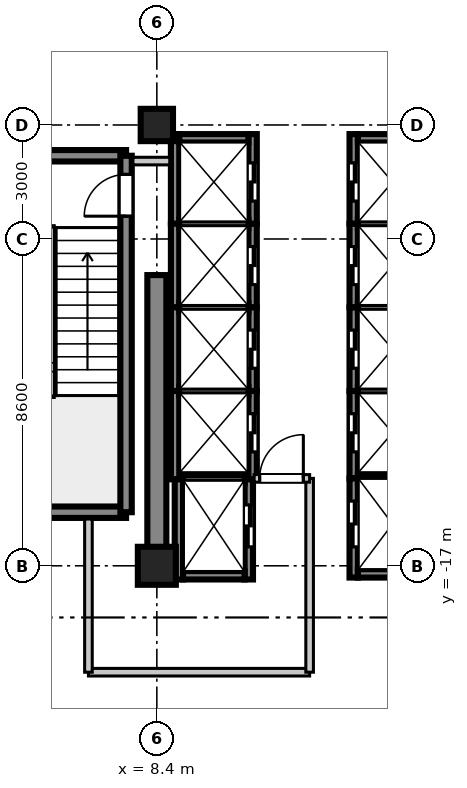
"""IFC4 building model, lengths in metres.
Left out: names, types, materials, properties, quantities, classifications, styles, units other than length and angle.
Written with IfcOpenShell. Run it as: python <this file> out.ifc"""

import sys

from ifc_helpers import new_model, si_unit, direction, frame, frame_2d, origin, origin_2d, place, context, subcontext, project, spatial, rectangle, extrude, source, transform, mapped, element, fill, save


model = new_model("IFC4")
c1 = context("Model", 3, precision=1e-05, world=origin(), true_north=direction((0.0, 1.0)))
c2 = subcontext(c1, "Body", "Model", "MODEL_VIEW")
j1 = project(units=[si_unit("LENGTHUNIT", "METRE"), si_unit("PLANEANGLEUNIT", "RADIAN")], contexts=[c1])
p1 = place(None, origin())
s1 = spatial("IfcSite", under=j1, at=p1, CompositionType="ELEMENT")
p2 = place(p1, origin())
s2 = spatial("IfcBuilding", under=s1, at=p2, CompositionType="ELEMENT")
p3 = place(p2, frame((0.0, 0.0, 256.7)))
s3 = spatial("IfcBuildingStorey", under=s2, at=p3, CompositionType="ELEMENT", Elevation=256.7)
m1 = source(origin(), c2, "Body", "SweptSolid", [
    extrude(rectangle(XDim=1.0, YDim=1.0, at=origin_2d()), origin(), (0.0, 0.0, 1.0), 4.755),
])
p4 = place(p3, frame((8.4, -17.0, 0.0), z_axis=(0.0, 0.0, 1.0), x_axis=(1.0, 0.0, 0.0)))
e1 = element("IfcColumn", 1, at=p4, inside=s3, PredefinedType="COLUMN", context=c2, shape_type="MappedRepresentation", body=[
    mapped(m1, transform((0.0, 0.0, 0.0), scale=1.0)),
])
m2 = source(origin(), c2, "Body", "SweptSolid", [
    extrude(rectangle(XDim=0.85, YDim=0.85, at=origin_2d()), origin(), (0.0, 0.0, 1.0), 4.755),
])
p5 = place(p3, frame((8.4, -5.4, 0.0), z_axis=(0.0, 0.0, 1.0), x_axis=(1.0, 0.0, 0.0)))
e2 = element("IfcColumn", 2, at=p5, inside=s3, PredefinedType="PILASTER", context=c2, shape_type="MappedRepresentation", body=[
    mapped(m2, transform((0.0, 0.0, 0.0), scale=1.0)),
])
m3 = source(origin(), c2, "Body", "SweptSolid", [
    extrude(rectangle(XDim=7.65, YDim=0.5, at=frame_2d((3.825, 0.0))), origin(), (0.0, 0.0, 1.0), 4.44),
])
p6 = place(p3, frame((8.4, -17.0, 0.0), z_axis=(0.0, 0.0, 1.0), x_axis=(0.0, 1.0, 0.0)))
e3 = element("IfcWall", 3, at=p6, inside=s3, PredefinedType="SHEAR", context=c2, shape_type="MappedRepresentation", body=[
    mapped(m3, transform((0.0, 0.0, 0.0), scale=1.0)),
])
m4 = source(origin(), c2, "Body", "SweptSolid", [
    extrude(rectangle(XDim=3.98, YDim=0.3, at=frame_2d((1.99, 0.0))), origin(), (0.0, 0.0, 1.0), 4.44),
])
for number, where, z_axis, x_axis in (
    (4, (3.61, -15.59, 0.0), (0.0, 0.0, 1.0), (1.0, 0.0, 0.0)),
    (5, (3.61, -6.21, 0.0), (0.0, 0.0, 1.0), (1.0, 0.0, 0.0)),
):
    element("IfcWall", number, at=place(p3, frame(where, z_axis=z_axis, x_axis=x_axis)), inside=s3, PredefinedType="SHEAR", context=c2, shape_type="MappedRepresentation", body=[
        mapped(m4, transform((0.0, 0.0, 0.0), scale=1.0)),
    ])
m5 = source(origin(), c2, "Body", "SweptSolid", [
    extrude(rectangle(XDim=9.38, YDim=0.3, at=frame_2d((4.69, 0.0))), origin(), (0.0, 0.0, 1.0), 4.44),
])
p7 = place(p3, frame((7.59, -15.59, 0.0), z_axis=(0.0, 0.0, 1.0), x_axis=(0.0, 1.0, 0.0)))
e6 = element("IfcWall", 6, at=p7, inside=s3, PredefinedType="SHEAR", context=c2, shape_type="MappedRepresentation", body=[
    mapped(m5, transform((0.0, 0.0, 0.0), scale=1.0)),
])
p8 = place(p7, frame((7.79, 0.0, 0.0)))
e7 = element("IfcOpeningElement", 7, at=p8, cuts=e6, PredefinedType="OPENING", context=c2, shape_type="SweptSolid", body=[
    extrude(rectangle(XDim=1.1, YDim=2.15, at=frame_2d((0.55, 1.075))), frame((0.0, 0.16, 0.0), z_axis=(0.0, -1.0, 0.0), x_axis=(1.0, 0.0, 0.0)), (0.0, 0.0, 1.0), 0.32),
])
m6 = source(origin(), c2, "Body", "SweptSolid", [
    extrude(rectangle(XDim=2.36, YDim=0.22, at=frame_2d((1.18, 0.0))), origin(), (0.0, 0.0, 1.0), 4.44),
])
p9 = place(p3, frame((13.58, -8.0, 0.0), z_axis=(0.0, 0.0, 1.0), x_axis=(0.0, 1.0, 0.0)))
e8 = element("IfcWall", 8, at=p9, inside=s3, PredefinedType="SHEAR", context=c2, shape_type="MappedRepresentation", body=[
    mapped(m6, transform((0.0, 0.0, 0.0), scale=1.0)),
])
p10 = place(p9, frame((0.6, 0.0, 0.0)))
e9 = element("IfcOpeningElement", 9, at=p10, cuts=e8, PredefinedType="OPENING", context=c2, shape_type="SweptSolid", body=[
    extrude(rectangle(XDim=1.0, YDim=2.2, at=frame_2d((0.5, 1.1))), frame((0.0, 0.12, 0.0), z_axis=(0.0, -1.0, 0.0), x_axis=(1.0, 0.0, 0.0)), (0.0, 0.0, 1.0), 0.24),
])
m7 = source(origin(), c2, "Body", "SweptSolid", [
    extrude(rectangle(XDim=1.82, YDim=0.22, at=frame_2d((0.91, 0.0))), origin(), (0.0, 0.0, 1.0), 4.44),
])
p11 = place(p3, frame((13.69, -5.75, 0.0), z_axis=(0.0, 0.0, 1.0), x_axis=(1.0, 0.0, 0.0)))
e10 = element("IfcWall", 10, at=p11, inside=s3, PredefinedType="SHEAR", context=c2, shape_type="MappedRepresentation", body=[
    mapped(m7, transform((0.0, 0.0, 0.0), scale=1.0)),
])
m8 = source(origin(), c2, "Body", "SweptSolid", [
    extrude(rectangle(XDim=2.2, YDim=0.22, at=frame_2d((1.1, 0.0))), origin(), (0.0, 0.0, 1.0), 4.44),
])
p12 = place(p3, frame((13.58, -10.2, 0.0), z_axis=(0.0, 0.0, 1.0), x_axis=(0.0, 1.0, 0.0)))
e11 = element("IfcWall", 11, at=p12, inside=s3, PredefinedType="SHEAR", context=c2, shape_type="MappedRepresentation", body=[
    mapped(m8, transform((0.0, 0.0, 0.0), scale=1.0)),
])
p13 = place(p12, frame((0.6, 0.0, 0.0)))
e12 = element("IfcOpeningElement", 12, at=p13, cuts=e11, PredefinedType="OPENING", context=c2, shape_type="SweptSolid", body=[
    extrude(rectangle(XDim=1.0, YDim=2.2, at=frame_2d((0.5, 1.1))), frame((0.0, 0.12, 0.0), z_axis=(0.0, -1.0, 0.0), x_axis=(1.0, 0.0, 0.0)), (0.0, 0.0, 1.0), 0.24),
])
m9 = source(origin(), c2, "Body", "SweptSolid", [
    extrude(rectangle(XDim=1.82, YDim=0.22, at=frame_2d((0.91, 0.0))), origin(), (0.0, 0.0, 1.0), 4.8),
])
p14 = place(p3, frame((13.69, -8.0, 0.0), z_axis=(0.0, 0.0, 1.0), x_axis=(1.0, 0.0, 0.0)))
e13 = element("IfcWall", 13, at=p14, inside=s3, PredefinedType="SHEAR", context=c2, shape_type="MappedRepresentation", body=[
    mapped(m9, transform((0.0, 0.0, 0.0), scale=1.0)),
])
p15 = place(p3, frame((13.58, -12.4, 0.0), z_axis=(0.0, 0.0, 1.0), x_axis=(0.0, 1.0, 0.0)))
e14 = element("IfcWall", 14, at=p15, inside=s3, PredefinedType="SHEAR", context=c2, shape_type="MappedRepresentation", body=[
    mapped(m8, transform((0.0, 0.0, 0.0), scale=1.0)),
])
p16 = place(p15, frame((0.6, 0.0, 0.0)))
e15 = element("IfcOpeningElement", 15, at=p16, cuts=e14, PredefinedType="OPENING", context=c2, shape_type="SweptSolid", body=[
    extrude(rectangle(XDim=1.0, YDim=2.2, at=frame_2d((0.5, 1.1))), frame((0.0, 0.12, 0.0), z_axis=(0.0, -1.0, 0.0), x_axis=(1.0, 0.0, 0.0)), (0.0, 0.0, 1.0), 0.24),
])
p17 = place(p3, frame((13.69, -10.2, 0.0), z_axis=(0.0, 0.0, 1.0), x_axis=(1.0, 0.0, 0.0)))
e16 = element("IfcWall", 16, at=p17, inside=s3, PredefinedType="SHEAR", context=c2, shape_type="MappedRepresentation", body=[
    mapped(m9, transform((0.0, 0.0, 0.0), scale=1.0)),
])
m10 = source(origin(), c2, "Body", "SweptSolid", [
    extrude(rectangle(XDim=2.3, YDim=0.22, at=frame_2d((1.15, 0.0))), origin(), (0.0, 0.0, 1.0), 4.44),
])
p18 = place(p3, frame((13.58, -14.7, 0.0), z_axis=(0.0, 0.0, 1.0), x_axis=(0.0, 1.0, 0.0)))
e17 = element("IfcWall", 17, at=p18, inside=s3, PredefinedType="SHEAR", context=c2, shape_type="MappedRepresentation", body=[
    mapped(m10, transform((0.0, 0.0, 0.0), scale=1.0)),
])
p19 = place(p18, frame((0.7, 0.0, 0.0)))
e18 = element("IfcOpeningElement", 18, at=p19, cuts=e17, PredefinedType="OPENING", context=c2, shape_type="SweptSolid", body=[
    extrude(rectangle(XDim=1.0, YDim=2.2, at=frame_2d((0.5, 1.1))), frame((0.0, 0.12, 0.0), z_axis=(0.0, -1.0, 0.0), x_axis=(1.0, 0.0, 0.0)), (0.0, 0.0, 1.0), 0.24),
])
p20 = place(p3, frame((13.69, -12.4, 0.0), z_axis=(0.0, 0.0, 1.0), x_axis=(1.0, 0.0, 0.0)))
e19 = element("IfcWall", 19, at=p20, inside=s3, PredefinedType="SHEAR", context=c2, shape_type="MappedRepresentation", body=[
    mapped(m9, transform((0.0, 0.0, 0.0), scale=1.0)),
])
p21 = place(p3, frame((8.88, -8.0, 0.0), z_axis=(0.0, 0.0, 1.0), x_axis=(0.0, 1.0, 0.0)))
e20 = element("IfcWall", 20, at=p21, inside=s3, PredefinedType="SHEAR", context=c2, shape_type="MappedRepresentation", body=[
    mapped(m6, transform((0.0, 0.0, 0.0), scale=1.0)),
])
p22 = place(p3, frame((10.92, -8.0, 0.0), z_axis=(0.0, 0.0, 1.0), x_axis=(0.0, 1.0, 0.0)))
e21 = element("IfcWall", 21, at=p22, inside=s3, PredefinedType="SHEAR", context=c2, shape_type="MappedRepresentation", body=[
    mapped(m6, transform((0.0, 0.0, 0.0), scale=1.0)),
])
p23 = place(p22, frame((0.6, 0.0, 0.0)))
e22 = element("IfcOpeningElement", 22, at=p23, cuts=e21, PredefinedType="OPENING", context=c2, shape_type="SweptSolid", body=[
    extrude(rectangle(XDim=1.0, YDim=2.2, at=frame_2d((0.5, 1.1))), frame((0.0, 0.12, 0.0), z_axis=(0.0, -1.0, 0.0), x_axis=(1.0, 0.0, 0.0)), (0.0, 0.0, 1.0), 0.24),
])
p24 = place(p3, frame((8.99, -5.75, 0.0), z_axis=(0.0, 0.0, 1.0), x_axis=(1.0, 0.0, 0.0)))
e23 = element("IfcWall", 23, at=p24, inside=s3, PredefinedType="SHEAR", context=c2, shape_type="MappedRepresentation", body=[
    mapped(m7, transform((0.0, 0.0, 0.0), scale=1.0)),
])
p25 = place(p3, frame((8.88, -10.2, 0.0), z_axis=(0.0, 0.0, 1.0), x_axis=(0.0, 1.0, 0.0)))
e24 = element("IfcWall", 24, at=p25, inside=s3, PredefinedType="SHEAR", context=c2, shape_type="MappedRepresentation", body=[
    mapped(m8, transform((0.0, 0.0, 0.0), scale=1.0)),
])
p26 = place(p3, frame((10.92, -10.2, 0.0), z_axis=(0.0, 0.0, 1.0), x_axis=(0.0, 1.0, 0.0)))
e25 = element("IfcWall", 25, at=p26, inside=s3, PredefinedType="SHEAR", context=c2, shape_type="MappedRepresentation", body=[
    mapped(m8, transform((0.0, 0.0, 0.0), scale=1.0)),
])
p27 = place(p26, frame((0.6, 0.0, 0.0)))
e26 = element("IfcOpeningElement", 26, at=p27, cuts=e25, PredefinedType="OPENING", context=c2, shape_type="SweptSolid", body=[
    extrude(rectangle(XDim=1.0, YDim=2.2, at=frame_2d((0.5, 1.1))), frame((0.0, 0.12, 0.0), z_axis=(0.0, -1.0, 0.0), x_axis=(1.0, 0.0, 0.0)), (0.0, 0.0, 1.0), 0.24),
])
p28 = place(p3, frame((8.99, -8.0, 0.0), z_axis=(0.0, 0.0, 1.0), x_axis=(1.0, 0.0, 0.0)))
e27 = element("IfcWall", 27, at=p28, inside=s3, PredefinedType="SHEAR", context=c2, shape_type="MappedRepresentation", body=[
    mapped(m9, transform((0.0, 0.0, 0.0), scale=1.0)),
])
p29 = place(p3, frame((8.88, -12.4, 0.0), z_axis=(0.0, 0.0, 1.0), x_axis=(0.0, 1.0, 0.0)))
e28 = element("IfcWall", 28, at=p29, inside=s3, PredefinedType="SHEAR", context=c2, shape_type="MappedRepresentation", body=[
    mapped(m8, transform((0.0, 0.0, 0.0), scale=1.0)),
])
p30 = place(p3, frame((10.92, -12.4, 0.0), z_axis=(0.0, 0.0, 1.0), x_axis=(0.0, 1.0, 0.0)))
e29 = element("IfcWall", 29, at=p30, inside=s3, PredefinedType="SHEAR", context=c2, shape_type="MappedRepresentation", body=[
    mapped(m8, transform((0.0, 0.0, 0.0), scale=1.0)),
])
p31 = place(p30, frame((0.6, 0.0, 0.0)))
e30 = element("IfcOpeningElement", 30, at=p31, cuts=e29, PredefinedType="OPENING", context=c2, shape_type="SweptSolid", body=[
    extrude(rectangle(XDim=1.0, YDim=2.2, at=frame_2d((0.5, 1.1))), frame((0.0, 0.12, 0.0), z_axis=(0.0, -1.0, 0.0), x_axis=(1.0, 0.0, 0.0)), (0.0, 0.0, 1.0), 0.24),
])
p32 = place(p3, frame((8.99, -10.2, 0.0), z_axis=(0.0, 0.0, 1.0), x_axis=(1.0, 0.0, 0.0)))
e31 = element("IfcWall", 31, at=p32, inside=s3, PredefinedType="SHEAR", context=c2, shape_type="MappedRepresentation", body=[
    mapped(m9, transform((0.0, 0.0, 0.0), scale=1.0)),
])
m11 = source(origin(), c2, "Body", "SweptSolid", [
    extrude(rectangle(XDim=2.325, YDim=0.22, at=frame_2d((1.163, 0.0))), origin(), (0.0, 0.0, 1.0), 4.44),
])
p33 = place(p3, frame((8.88, -14.725, 0.0), z_axis=(0.0, 0.0, 1.0), x_axis=(0.0, 1.0, 0.0)))
e32 = element("IfcWall", 32, at=p33, inside=s3, PredefinedType="SHEAR", context=c2, shape_type="MappedRepresentation", body=[
    mapped(m11, transform((0.0, 0.0, 0.0), scale=1.0)),
])
p34 = place(p3, frame((10.92, -14.725, 0.0), z_axis=(0.0, 0.0, 1.0), x_axis=(0.0, 1.0, 0.0)))
e33 = element("IfcWall", 33, at=p34, inside=s3, PredefinedType="SHEAR", context=c2, shape_type="MappedRepresentation", body=[
    mapped(m11, transform((0.0, 0.0, 0.0), scale=1.0)),
])
p35 = place(p34, frame((0.725, 0.0, 0.0)))
e34 = element("IfcOpeningElement", 34, at=p35, cuts=e33, PredefinedType="OPENING", context=c2, shape_type="SweptSolid", body=[
    extrude(rectangle(XDim=1.0, YDim=2.2, at=frame_2d((0.5, 1.1))), frame((0.0, 0.12, 0.0), z_axis=(0.0, -1.0, 0.0), x_axis=(1.0, 0.0, 0.0)), (0.0, 0.0, 1.0), 0.24),
])
p36 = place(p3, frame((8.99, -12.4, 0.0), z_axis=(0.0, 0.0, 1.0), x_axis=(1.0, 0.0, 0.0)))
e35 = element("IfcWall", 35, at=p36, inside=s3, PredefinedType="SHEAR", context=c2, shape_type="MappedRepresentation", body=[
    mapped(m9, transform((0.0, 0.0, 0.0), scale=1.0)),
])
m12 = source(origin(), c2, "Body", "SweptSolid", [
    extrude(rectangle(XDim=2.635, YDim=0.22, at=frame_2d((1.317, 0.0))), origin(), (0.0, 0.0, 1.0), 4.44),
])
p37 = place(p3, frame((8.98, -17.36, 0.0), z_axis=(0.0, 0.0, 1.0), x_axis=(0.0, 1.0, 0.0)))
e36 = element("IfcWall", 36, at=p37, inside=s3, PredefinedType="SHEAR", context=c2, shape_type="MappedRepresentation", body=[
    mapped(m12, transform((0.0, 0.0, 0.0), scale=1.0)),
])
p38 = place(p3, frame((10.82, -17.36, 0.0), z_axis=(0.0, 0.0, 1.0), x_axis=(0.0, 1.0, 0.0)))
e37 = element("IfcWall", 37, at=p38, inside=s3, PredefinedType="SHEAR", context=c2, shape_type="MappedRepresentation", body=[
    mapped(m12, transform((0.0, 0.0, 0.0), scale=1.0)),
])
p39 = place(p38, frame((0.86, 0.0, 0.0)))
e38 = element("IfcOpeningElement", 38, at=p39, cuts=e37, PredefinedType="OPENING", context=c2, shape_type="SweptSolid", body=[
    extrude(rectangle(XDim=1.1, YDim=2.2, at=frame_2d((0.55, 1.1))), frame((0.0, 0.12, 0.0), z_axis=(0.0, -1.0, 0.0), x_axis=(1.0, 0.0, 0.0)), (0.0, 0.0, 1.0), 0.24),
])
m13 = source(origin(), c2, "Body", "SweptSolid", [
    extrude(rectangle(XDim=1.62, YDim=0.22, at=frame_2d((0.81, 0.0))), origin(), (0.0, 0.0, 1.0), 4.44),
])
p40 = place(p3, frame((9.09, -17.25, 0.0), z_axis=(0.0, 0.0, 1.0), x_axis=(1.0, 0.0, 0.0)))
e39 = element("IfcWall", 39, at=p40, inside=s3, PredefinedType="SHEAR", context=c2, shape_type="MappedRepresentation", body=[
    mapped(m13, transform((0.0, 0.0, 0.0), scale=1.0)),
])
m14 = source(origin(), c2, "Body", "SweptSolid", [
    extrude(rectangle(XDim=1.62, YDim=0.22, at=frame_2d((0.81, 0.0))), origin(), (0.0, 0.0, 1.0), 4.8),
])
p41 = place(p3, frame((9.09, -14.725, 0.0), z_axis=(0.0, 0.0, 1.0), x_axis=(1.0, 0.0, 0.0)))
e40 = element("IfcWall", 40, at=p41, inside=s3, PredefinedType="SHEAR", context=c2, shape_type="MappedRepresentation", body=[
    mapped(m14, transform((0.0, 0.0, 0.0), scale=1.0)),
])
m15 = source(origin(), c2, "Body", "SweptSolid", [
    extrude(rectangle(XDim=2.61, YDim=0.22, at=frame_2d((1.305, 0.0))), origin(), (0.0, 0.0, 1.0), 4.44),
])
p42 = place(p3, frame((13.58, -17.31, 0.0), z_axis=(0.0, 0.0, 1.0), x_axis=(0.0, 1.0, 0.0)))
e41 = element("IfcWall", 41, at=p42, inside=s3, PredefinedType="SHEAR", context=c2, shape_type="MappedRepresentation", body=[
    mapped(m15, transform((0.0, 0.0, 0.0), scale=1.0)),
])
p43 = place(p42, frame((0.81, 0.0, 0.0)))
e42 = element("IfcOpeningElement", 42, at=p43, cuts=e41, PredefinedType="OPENING", context=c2, shape_type="SweptSolid", body=[
    extrude(rectangle(XDim=1.2, YDim=2.2, at=frame_2d((0.6, 1.1))), frame((0.0, 0.12, 0.0), z_axis=(0.0, -1.0, 0.0), x_axis=(1.0, 0.0, 0.0)), (0.0, 0.0, 1.0), 0.24),
])
p44 = place(p3, frame((13.69, -17.2, 0.0), z_axis=(0.0, 0.0, 1.0), x_axis=(1.0, 0.0, 0.0)))
e43 = element("IfcWall", 43, at=p44, inside=s3, PredefinedType="SHEAR", context=c2, shape_type="MappedRepresentation", body=[
    mapped(m7, transform((0.0, 0.0, 0.0), scale=1.0)),
])
p45 = place(p3, frame((13.69, -14.7, 0.0), z_axis=(0.0, 0.0, 1.0), x_axis=(1.0, 0.0, 0.0)))
e44 = element("IfcWall", 44, at=p45, inside=s3, PredefinedType="SHEAR", context=c2, shape_type="MappedRepresentation", body=[
    mapped(m9, transform((0.0, 0.0, 0.0), scale=1.0)),
])
m16 = source(origin(), c2, "Body", "SweptSolid", [
    extrude(rectangle(XDim=5.82, YDim=0.2, at=frame_2d((2.91, 0.0))), origin(), (0.0, 0.0, 1.0), 3.4),
])
p46 = place(p3, frame((6.6, -19.8, 0.0), z_axis=(0.0, 0.0, 1.0), x_axis=(1.0, 0.0, 0.0)))
e45 = element("IfcWall", 45, at=p46, inside=s3, PredefinedType="PARTITIONING", context=c2, shape_type="MappedRepresentation", body=[
    mapped(m16, transform((0.0, 0.0, 0.0), scale=1.0)),
])
m17 = source(origin(), c2, "Body", "SweptSolid", [
    extrude(rectangle(XDim=4.03, YDim=0.2, at=frame_2d((2.015, 0.0))), origin(), (0.0, 0.0, 1.0), 3.4),
])
p47 = place(p3, frame((6.6, -19.8, 0.0), z_axis=(0.0, 0.0, 1.0), x_axis=(0.0, 1.0, 0.0)))
e46 = element("IfcWall", 46, at=p47, inside=s3, PredefinedType="PARTITIONING", context=c2, shape_type="MappedRepresentation", body=[
    mapped(m17, transform((0.0, 0.0, 0.0), scale=1.0)),
])
m18 = source(origin(), c2, "Body", "SweptSolid", [
    extrude(rectangle(XDim=5.1, YDim=0.2, at=frame_2d((2.55, 0.0))), origin(), (0.0, 0.0, 1.0), 3.4),
])
p48 = place(p3, frame((12.42, -19.8, 0.0), z_axis=(0.0, 0.0, 1.0), x_axis=(0.0, 1.0, 0.0)))
e47 = element("IfcWall", 47, at=p48, inside=s3, PredefinedType="PARTITIONING", context=c2, shape_type="MappedRepresentation", body=[
    mapped(m18, transform((0.0, 0.0, 0.0), scale=1.0)),
])
m19 = source(origin(), c2, "Body", "SweptSolid", [
    extrude(rectangle(XDim=1.46, YDim=0.2, at=frame_2d((0.73, 0.0))), origin(), (0.0, 0.0, 1.0), 3.4),
])
p49 = place(p3, frame((10.96, -14.7, 0.0), z_axis=(0.0, 0.0, 1.0), x_axis=(1.0, 0.0, 0.0)))
e48 = element("IfcWall", 48, at=p49, inside=s3, PredefinedType="PARTITIONING", context=c2, shape_type="MappedRepresentation", body=[
    mapped(m19, transform((0.0, 0.0, 0.0), scale=1.0)),
])
p50 = place(p49, frame((0.145, 0.0, 0.0)))
e49 = element("IfcOpeningElement", 49, at=p50, cuts=e48, PredefinedType="OPENING", context=c2, shape_type="SweptSolid", body=[
    extrude(rectangle(XDim=1.15, YDim=2.15, at=frame_2d((0.575, 1.075))), frame((0.0, 0.11, 0.0), z_axis=(0.0, -1.0, 0.0), x_axis=(1.0, 0.0, 0.0)), (0.0, 0.0, 1.0), 0.22),
])
m20 = source(origin(), c2, "Body", "SweptSolid", [
    extrude(rectangle(XDim=0.97, YDim=0.2, at=frame_2d((0.485, 0.0))), origin(), (0.0, 0.0, 1.0), 3.4),
])
p51 = place(p3, frame((7.77, -6.35, 0.0), z_axis=(0.0, 0.0, 1.0), x_axis=(1.0, 0.0, 0.0)))
e50 = element("IfcWall", 50, at=p51, inside=s3, PredefinedType="PARTITIONING", context=c2, shape_type="MappedRepresentation", body=[
    mapped(m20, transform((0.0, 0.0, 0.0), scale=1.0)),
])
m21 = source(origin(), c2, "Body", "SweptSolid", [
    extrude(rectangle(XDim=1.1, YDim=2.15, at=frame_2d((0.55, 1.075))), frame((0.0, 0.025, 0.0), z_axis=(0.0, -1.0, 0.0), x_axis=(1.0, 0.0, 0.0)), (0.0, 0.0, 1.0), 0.05),
])
p52 = place(p8, origin())
e51 = element("IfcDoor", 51, at=p52, inside=s3, OperationType="SINGLE_SWING_LEFT", PredefinedType="DOOR", context=c2, shape_type="MappedRepresentation", body=[
    mapped(m21, transform((0.0, 0.0, 0.0), scale=1.0)),
])
fill(e7, e51)
m22 = source(origin(), c2, "Body", "SweptSolid", [
    extrude(rectangle(XDim=1.0, YDim=2.2, at=frame_2d((0.5, 1.1))), frame((0.0, 0.025, 0.0), z_axis=(0.0, -1.0, 0.0), x_axis=(1.0, 0.0, 0.0)), (0.0, 0.0, 1.0), 0.05),
])
p53 = place(p10, origin())
e52 = element("IfcDoor", 52, at=p53, inside=s3, OperationType="DOUBLE_DOOR_SLIDING", PredefinedType="DOOR", context=c2, shape_type="MappedRepresentation", body=[
    mapped(m22, transform((0.0, 0.0, 0.0), scale=1.0)),
])
fill(e9, e52)
p54 = place(p13, origin())
e53 = element("IfcDoor", 53, at=p54, inside=s3, OperationType="DOUBLE_DOOR_SLIDING", PredefinedType="DOOR", context=c2, shape_type="MappedRepresentation", body=[
    mapped(m22, transform((0.0, 0.0, 0.0), scale=1.0)),
])
fill(e12, e53)
p55 = place(p16, origin())
e54 = element("IfcDoor", 54, at=p55, inside=s3, OperationType="DOUBLE_DOOR_SLIDING", PredefinedType="DOOR", context=c2, shape_type="MappedRepresentation", body=[
    mapped(m22, transform((0.0, 0.0, 0.0), scale=1.0)),
])
fill(e15, e54)
p56 = place(p19, origin())
e55 = element("IfcDoor", 55, at=p56, inside=s3, OperationType="DOUBLE_DOOR_SLIDING", PredefinedType="DOOR", context=c2, shape_type="MappedRepresentation", body=[
    mapped(m22, transform((0.0, 0.0, 0.0), scale=1.0)),
])
fill(e18, e55)
p57 = place(p23, frame((1.0, 0.0, 0.0), z_axis=(0.0, 0.0, 1.0), x_axis=(-1.0, 0.0, 0.0)))
e56 = element("IfcDoor", 56, at=p57, inside=s3, OperationType="DOUBLE_DOOR_SLIDING", PredefinedType="DOOR", context=c2, shape_type="MappedRepresentation", body=[
    mapped(m22, transform((0.0, 0.0, 0.0), scale=1.0)),
])
fill(e22, e56)
p58 = place(p27, frame((1.0, 0.0, 0.0), z_axis=(0.0, 0.0, 1.0), x_axis=(-1.0, 0.0, 0.0)))
e57 = element("IfcDoor", 57, at=p58, inside=s3, OperationType="DOUBLE_DOOR_SLIDING", PredefinedType="DOOR", context=c2, shape_type="MappedRepresentation", body=[
    mapped(m22, transform((0.0, 0.0, 0.0), scale=1.0)),
])
fill(e26, e57)
p59 = place(p31, frame((1.0, 0.0, 0.0), z_axis=(0.0, 0.0, 1.0), x_axis=(-1.0, 0.0, 0.0)))
e58 = element("IfcDoor", 58, at=p59, inside=s3, OperationType="DOUBLE_DOOR_SLIDING", PredefinedType="DOOR", context=c2, shape_type="MappedRepresentation", body=[
    mapped(m22, transform((0.0, 0.0, 0.0), scale=1.0)),
])
fill(e30, e58)
p60 = place(p35, frame((1.0, 0.0, 0.0), z_axis=(0.0, 0.0, 1.0), x_axis=(-1.0, 0.0, 0.0)))
e59 = element("IfcDoor", 59, at=p60, inside=s3, OperationType="DOUBLE_DOOR_SLIDING", PredefinedType="DOOR", context=c2, shape_type="MappedRepresentation", body=[
    mapped(m22, transform((0.0, 0.0, 0.0), scale=1.0)),
])
fill(e34, e59)
m23 = source(origin(), c2, "Body", "SweptSolid", [
    extrude(rectangle(XDim=1.1, YDim=2.2, at=frame_2d((0.55, 1.1))), frame((0.0, 0.025, 0.0), z_axis=(0.0, -1.0, 0.0), x_axis=(1.0, 0.0, 0.0)), (0.0, 0.0, 1.0), 0.05),
])
p61 = place(p39, frame((1.1, 0.0, 0.0), z_axis=(0.0, 0.0, 1.0), x_axis=(-1.0, 0.0, 0.0)))
e60 = element("IfcDoor", 60, at=p61, inside=s3, OperationType="DOUBLE_DOOR_SLIDING", PredefinedType="DOOR", context=c2, shape_type="MappedRepresentation", body=[
    mapped(m23, transform((0.0, 0.0, 0.0), scale=1.0)),
])
fill(e38, e60)
m24 = source(origin(), c2, "Body", "SweptSolid", [
    extrude(rectangle(XDim=1.2, YDim=2.2, at=frame_2d((0.6, 1.1))), frame((0.0, 0.025, 0.0), z_axis=(0.0, -1.0, 0.0), x_axis=(1.0, 0.0, 0.0)), (0.0, 0.0, 1.0), 0.05),
])
p62 = place(p43, origin())
e61 = element("IfcDoor", 61, at=p62, inside=s3, OperationType="DOUBLE_DOOR_SLIDING", PredefinedType="DOOR", context=c2, shape_type="MappedRepresentation", body=[
    mapped(m24, transform((0.0, 0.0, 0.0), scale=1.0)),
])
fill(e42, e61)
m25 = source(origin(), c2, "Body", "SweptSolid", [
    extrude(rectangle(XDim=1.15, YDim=2.15, at=frame_2d((0.575, 1.075))), frame((0.0, 0.025, 0.0), z_axis=(0.0, -1.0, 0.0), x_axis=(1.0, 0.0, 0.0)), (0.0, 0.0, 1.0), 0.05),
])
p63 = place(p50, origin())
e62 = element("IfcDoor", 62, at=p63, inside=s3, OperationType="SINGLE_SWING_RIGHT", PredefinedType="DOOR", context=c2, shape_type="MappedRepresentation", body=[
    mapped(m25, transform((0.0, 0.0, 0.0), scale=1.0)),
])
fill(e49, e62)
save(model, sys.argv[1])
